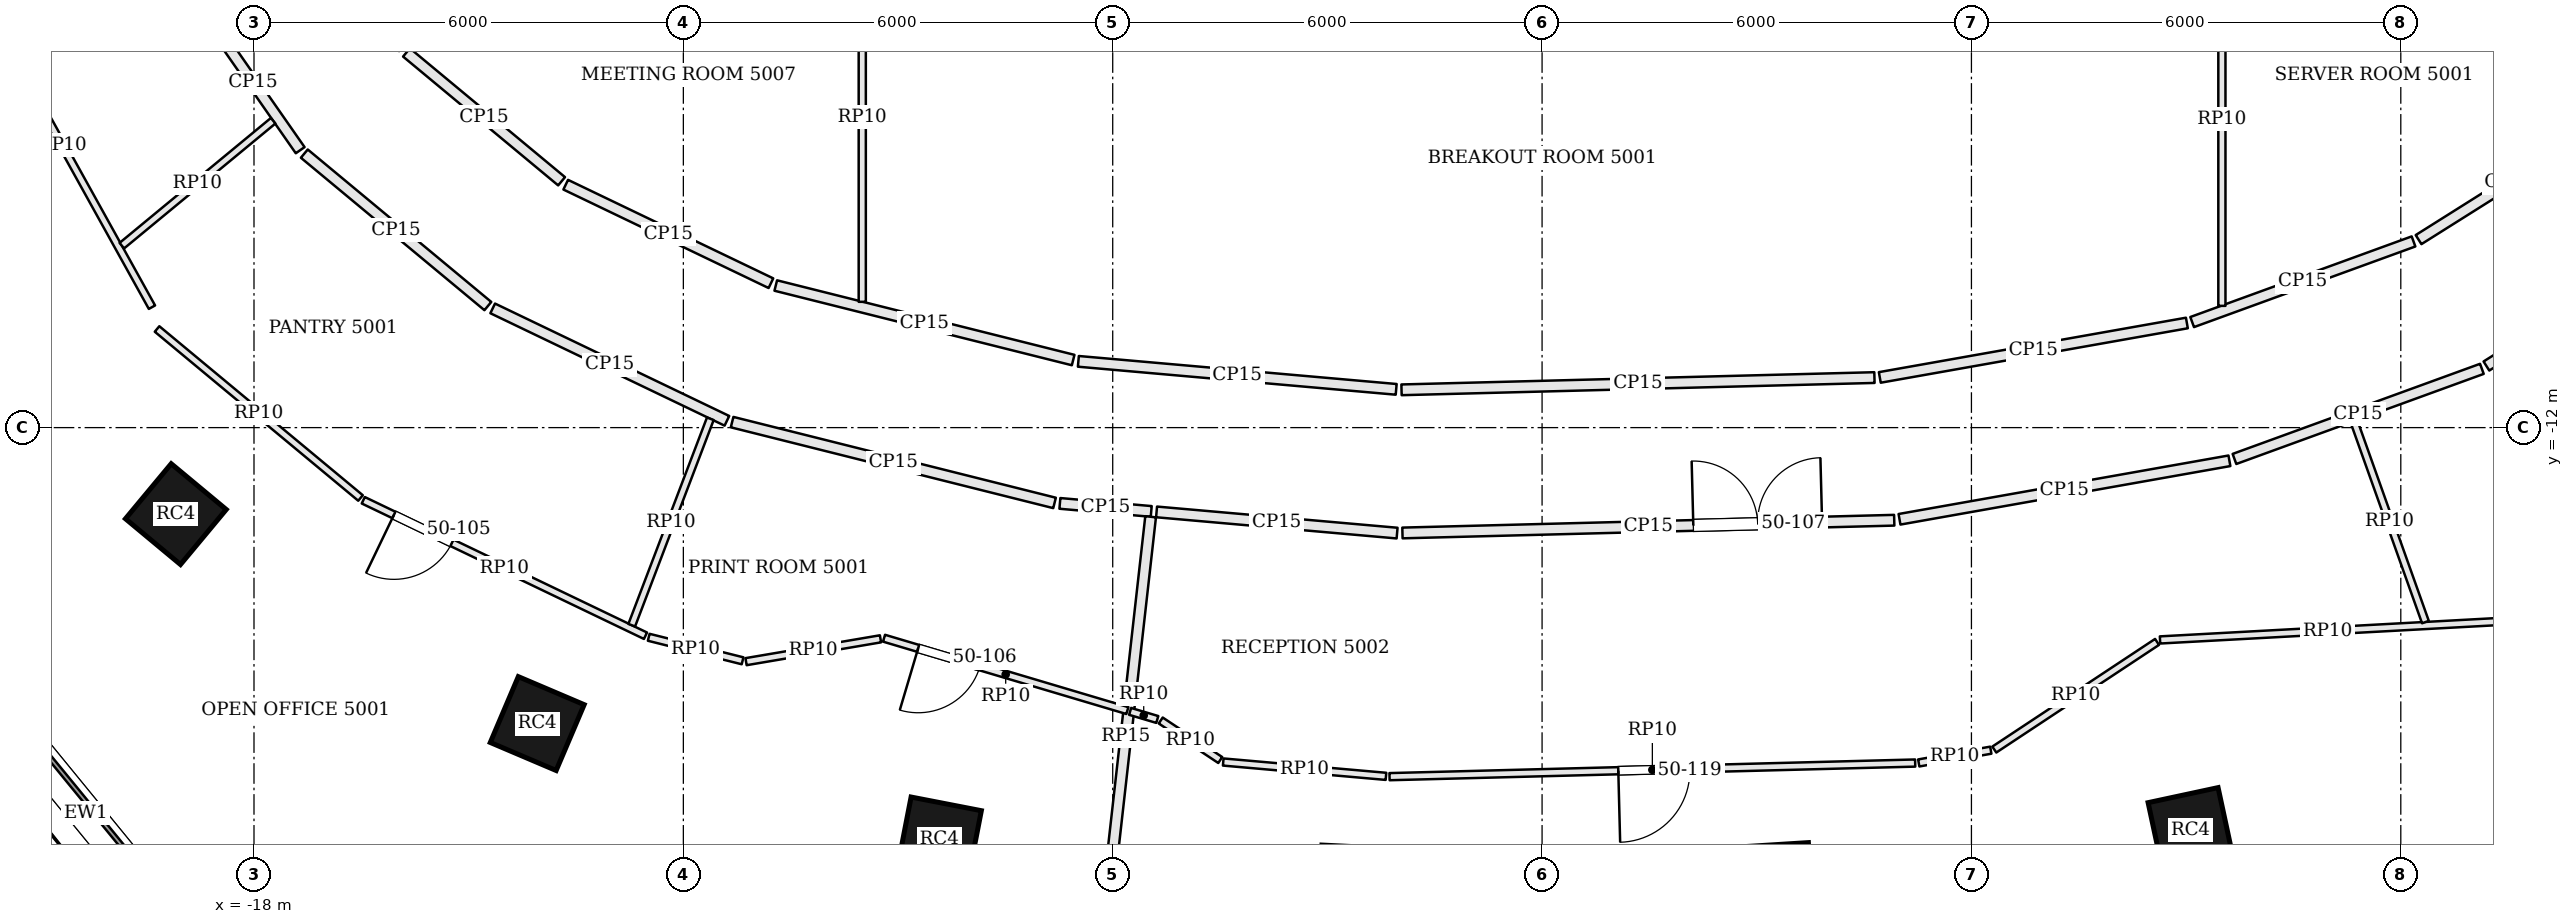
"""IFC4 building model, lengths in metres.
Left out: names, types, materials, properties, quantities, classifications, styles, units other than length and angle.
Written with IfcOpenShell. Run it as: python <this file> out.ifc"""

import sys

from ifc_helpers import new_model, si_unit, direction, frame, frame_2d, origin, origin_2d, place, context, subcontext, project, spatial, rectangle, extrude, element, fill, save


model = new_model("IFC4")
c1 = context("Model", 3, precision=1e-05, world=origin(), true_north=direction((0.0, 1.0)))
c2 = subcontext(c1, "Body", "Model", "MODEL_VIEW")
j1 = project(units=[si_unit("LENGTHUNIT", "METRE"), si_unit("PLANEANGLEUNIT", "RADIAN")], contexts=[c1])
p1 = place(None, origin())
s1 = spatial("IfcSite", under=j1, at=p1, CompositionType="ELEMENT")
p2 = place(p1, origin())
s2 = spatial("IfcBuilding", under=s1, at=p2, CompositionType="ELEMENT")
p3 = place(p2, frame((0.0, 0.0, 205.2)))
s3 = spatial("IfcBuildingStorey", under=s2, at=p3, CompositionType="ELEMENT", Elevation=205.2)
for number, where, z_axis, x_axis in (
    (1, (-19.092, -13.209, 0.0), (0.0, 0.0, 1.0), (0.769, -0.639, 0.0)),
    (2, (-14.042, -16.136, 0.0), (0.0, 0.0, 1.0), (0.92, -0.392, 0.0)),
    (3, (-8.422, -17.749, 0.0), (0.0, 0.0, 1.0), (0.982, -0.191, 0.0)),
    (4, (3.254, -18.33, 0.0), (0.0, 0.0, 1.0), (0.998, 0.063, 0.0)),
    (5, (9.063, -17.625, 0.0), (0.0, 0.0, 1.0), (0.978, 0.21, 0.0)),
):
    element("IfcColumn", number, at=place(p3, frame(where, z_axis=z_axis, x_axis=x_axis)), inside=s3, PredefinedType="COLUMN", context=c2, shape_type="SweptSolid", body=[
        extrude(rectangle(XDim=1.0, YDim=1.0, at=origin_2d()), origin(), (0.0, 0.0, 1.0), 3.9),
    ])
p4 = place(p3, frame((-21.696, -15.748, 0.0), z_axis=(0.0, 0.0, 1.0), x_axis=(0.632968710519, -0.774177377288, 0.0)))
e6 = element("IfcWall", 6, at=p4, inside=s3, PredefinedType="SOLIDWALL", context=c2, shape_type="SweptSolid", body=[
    extrude(rectangle(XDim=4.25, YDim=0.45, at=frame_2d((2.125, 0.0))), origin(), (0.0, 0.0, 1.0), 3.7),
])
p5 = place(p4, frame((1.075, 0.0, 0.9)))
e7 = element("IfcOpeningElement", 7, at=p5, cuts=e6, PredefinedType="OPENING", context=c2, shape_type="SweptSolid", body=[
    extrude(rectangle(XDim=2.1, YDim=2.3, at=frame_2d((1.05, 1.15))), frame((0.0, 0.235, 0.0), z_axis=(0.0, -1.0, 0.0), x_axis=(1.0, 0.0, 0.0)), (0.0, 0.0, 1.0), 0.47),
])
p6 = place(p3, frame((-20.168, -17.734, 3.9), z_axis=(0.0, 0.0, 1.0), x_axis=(0.632995189145, -0.774155727564, 0.0)))
e8 = element("IfcWall", 8, at=p6, inside=s3, PredefinedType="PARAPET", context=c2, shape_type="SweptSolid", body=[
    extrude(rectangle(XDim=1.589, YDim=0.3, at=frame_2d((0.795, 0.0))), origin(), (0.0, 0.0, 1.0), 1.1),
])
p7 = place(p3, frame((-18.674, -6.232, 0.0), z_axis=(0.0, 0.0, 1.0), x_axis=(0.572118665737, -0.820170855563, 0.0)))
e9 = element("IfcWall", 9, at=p7, inside=s3, PredefinedType="PARTITIONING", context=c2, shape_type="SweptSolid", body=[
    extrude(rectangle(XDim=2.306, YDim=0.15, at=frame_2d((1.153, 0.0))), origin(), (0.0, 0.0, 1.0), 3.084),
])
p8 = place(p3, frame((-17.297, -8.171, 0.0), z_axis=(0.0, 0.0, 1.0), x_axis=(0.769228575061, -0.638973707839, 0.0)))
e10 = element("IfcWall", 10, at=p8, inside=s3, PredefinedType="PARTITIONING", context=c2, shape_type="SweptSolid", body=[
    extrude(rectangle(XDim=3.334, YDim=0.15, at=frame_2d((1.667, 0.0))), origin(), (0.0, 0.0, 1.0), 3.084),
])
p9 = place(p3, frame((-14.664, -10.334, 0.0), z_axis=(0.0, 0.0, 1.0), x_axis=(0.901507315282, -0.432763862278, 0.0)))
e11 = element("IfcWall", 11, at=p9, inside=s3, PredefinedType="PARTITIONING", context=c2, shape_type="SweptSolid", body=[
    extrude(rectangle(XDim=3.63, YDim=0.15, at=frame_2d((1.815, 0.0))), origin(), (0.0, 0.0, 1.0), 3.084),
])
p10 = place(p3, frame((-11.319, -11.923, 0.0), z_axis=(0.0, 0.0, 1.0), x_axis=(0.969990815038, -0.243141561114, 0.0)))
e12 = element("IfcWall", 12, at=p10, inside=s3, PredefinedType="PARTITIONING", context=c2, shape_type="SweptSolid", body=[
    extrude(rectangle(XDim=4.645, YDim=0.15, at=frame_2d((2.323, 0.0))), origin(), (0.0, 0.0, 1.0), 3.084),
])
p11 = place(p3, frame((-6.738, -13.059, 0.0), z_axis=(0.0, 0.0, 1.0), x_axis=(0.996151409237, -0.087649129351, 0.0)))
e13 = element("IfcWall", 13, at=p11, inside=s3, PredefinedType="PARTITIONING", context=c2, shape_type="SweptSolid", body=[
    extrude(rectangle(XDim=1.281, YDim=0.15, at=frame_2d((0.641, 0.0))), origin(), (0.0, 0.0, 1.0), 3.084),
])
p12 = place(p3, frame((-6.161, -19.377, 0.0), z_axis=(0.0, 0.0, 1.0), x_axis=(0.111938367562, 0.993715151272, 0.0)))
e14 = element("IfcWall", 14, at=p12, inside=s3, PredefinedType="PARTITIONING", context=c2, shape_type="SweptSolid", body=[
    extrude(rectangle(XDim=6.17, YDim=0.15, at=frame_2d((3.085, 0.0))), origin(), (0.0, 0.0, 1.0), 3.184),
])
p13 = place(p3, frame((-5.387, -13.178, 0.0), z_axis=(0.0, 0.0, 1.0), x_axis=(0.996140835551, -0.087769218677, 0.0)))
e15 = element("IfcWall", 15, at=p13, inside=s3, PredefinedType="PARTITIONING", context=c2, shape_type="SweptSolid", body=[
    extrude(rectangle(XDim=3.374, YDim=0.15, at=frame_2d((1.687, 0.0))), origin(), (0.0, 0.0, 1.0), 3.084),
])
p14 = place(p3, frame((-1.951, -13.472, 0.0), z_axis=(0.0, 0.0, 1.0), x_axis=(0.999663898238, 0.025924709429, 0.0)))
e16 = element("IfcWall", 16, at=p14, inside=s3, PredefinedType="PARTITIONING", context=c2, shape_type="SweptSolid", body=[
    extrude(rectangle(XDim=6.875, YDim=0.15, at=frame_2d((3.437, 0.0))), origin(), (0.0, 0.0, 1.0), 3.084),
])
p15 = place(p14, frame((4.066, 0.0, 0.0)))
e17 = element("IfcOpeningElement", 17, at=p15, cuts=e16, PredefinedType="OPENING", context=c2, shape_type="SweptSolid", body=[
    extrude(rectangle(XDim=1.8, YDim=2.1, at=frame_2d((0.9, 1.05))), frame((0.0, 0.085, 0.0), z_axis=(0.0, -1.0, 0.0), x_axis=(1.0, 0.0, 0.0)), (0.0, 0.0, 1.0), 0.17),
])
p16 = place(p3, frame((4.995, -13.281, 0.0), z_axis=(0.0, 0.0, 1.0), x_axis=(0.98463411377, 0.174630071865, 0.0)))
e18 = element("IfcWall", 18, at=p16, inside=s3, PredefinedType="PARTITIONING", context=c2, shape_type="SweptSolid", body=[
    extrude(rectangle(XDim=4.682, YDim=0.15, at=frame_2d((2.341, 0.0))), origin(), (0.0, 0.0, 1.0), 3.084),
])
p17 = place(p3, frame((9.676, -12.438, 0.0), z_axis=(0.0, 0.0, 1.0), x_axis=(0.939640289748, 0.342163887461, 0.0)))
e19 = element("IfcWall", 19, at=p17, inside=s3, PredefinedType="PARTITIONING", context=c2, shape_type="SweptSolid", body=[
    extrude(rectangle(XDim=3.68, YDim=0.15, at=frame_2d((1.84, 0.0))), origin(), (0.0, 0.0, 1.0), 3.084),
])
p18 = place(p3, frame((13.197, -11.139, 0.0), z_axis=(0.0, 0.0, 1.0), x_axis=(0.846390903833, 0.532562144644, 0.0)))
e20 = element("IfcWall", 20, at=p18, inside=s3, PredefinedType="PARTITIONING", context=c2, shape_type="SweptSolid", body=[
    extrude(rectangle(XDim=3.481, YDim=0.15, at=frame_2d((1.741, 0.0))), origin(), (0.0, 0.0, 1.0), 3.084),
])
p19 = place(p18, frame((1.417, 0.0, 0.0)))
e21 = element("IfcOpeningElement", 21, at=p19, cuts=e20, PredefinedType="OPENING", context=c2, shape_type="SweptSolid", body=[
    extrude(rectangle(XDim=1.0, YDim=2.4, at=frame_2d((0.5, 1.2))), frame((0.0, 0.085, 0.0), z_axis=(0.0, -1.0, 0.0), x_axis=(1.0, 0.0, 0.0)), (0.0, 0.0, 1.0), 0.17),
])
p20 = place(p3, frame((14.777, -7.781, 0.0), z_axis=(0.0, 0.0, 1.0), x_axis=(-0.846359741043, -0.532611667862, 0.0)))
e22 = element("IfcWall", 22, at=p20, inside=s3, PredefinedType="PARTITIONING", context=c2, shape_type="SweptSolid", body=[
    extrude(rectangle(XDim=2.987, YDim=0.15, at=frame_2d((1.494, 0.0))), origin(), (0.0, 0.0, 1.0), 3.084),
])
p21 = place(p3, frame((12.178, -9.398, 0.0), z_axis=(0.0, 0.0, 1.0), x_axis=(-0.939609240084, -0.342249143093, 0.0)))
e23 = element("IfcWall", 23, at=p21, inside=s3, PredefinedType="PARTITIONING", context=c2, shape_type="SweptSolid", body=[
    extrude(rectangle(XDim=3.292, YDim=0.15, at=frame_2d((1.646, 0.0))), origin(), (0.0, 0.0, 1.0), 3.084),
])
p22 = place(p3, frame((9.01, -10.538, 0.0), z_axis=(0.0, 0.0, 1.0), x_axis=(-0.984645638575, -0.174565077936, 0.0)))
e24 = element("IfcWall", 24, at=p22, inside=s3, PredefinedType="PARTITIONING", context=c2, shape_type="SweptSolid", body=[
    extrude(rectangle(XDim=4.358, YDim=0.15, at=frame_2d((2.179, 0.0))), origin(), (0.0, 0.0, 1.0), 3.084),
])
p23 = place(p3, frame((4.645, -11.301, 0.0), z_axis=(0.0, 0.0, 1.0), x_axis=(-0.9996648469, -0.02588810291, 0.0)))
e25 = element("IfcWall", 25, at=p23, inside=s3, PredefinedType="PARTITIONING", context=c2, shape_type="SweptSolid", body=[
    extrude(rectangle(XDim=6.611, YDim=0.15, at=frame_2d((3.305, 0.0))), origin(), (0.0, 0.0, 1.0), 3.084),
])
p24 = place(p3, frame((-2.039, -11.465, 0.0), z_axis=(0.0, 0.0, 1.0), x_axis=(-0.996139855484, 0.087780341286, 0.0)))
e26 = element("IfcWall", 26, at=p24, inside=s3, PredefinedType="PARTITIONING", context=c2, shape_type="SweptSolid", body=[
    extrude(rectangle(XDim=4.458, YDim=0.15, at=frame_2d((2.229, 0.0))), origin(), (0.0, 0.0, 1.0), 3.084),
])
p25 = place(p3, frame((-6.553, -11.056, 0.0), z_axis=(0.0, 0.0, 1.0), x_axis=(-0.970004917182, 0.243085294995, 0.0)))
e27 = element("IfcWall", 27, at=p25, inside=s3, PredefinedType="PARTITIONING", context=c2, shape_type="SweptSolid", body=[
    extrude(rectangle(XDim=4.284, YDim=0.15, at=frame_2d((2.142, 0.0))), origin(), (0.0, 0.0, 1.0), 3.084),
])
p26 = place(p3, frame((-10.776, -9.982, 0.0), z_axis=(0.0, 0.0, 1.0), x_axis=(-0.901511079436, 0.432756020933, 0.0)))
e28 = element("IfcWall", 28, at=p26, inside=s3, PredefinedType="PARTITIONING", context=c2, shape_type="SweptSolid", body=[
    extrude(rectangle(XDim=3.181, YDim=0.15, at=frame_2d((1.59, 0.0))), origin(), (0.0, 0.0, 1.0), 3.084),
])
p27 = place(p3, frame((-13.702, -8.557, 0.0), z_axis=(0.0, 0.0, 1.0), x_axis=(-0.769221825067, 0.638981833733, 0.0)))
e29 = element("IfcWall", 29, at=p27, inside=s3, PredefinedType="PARTITIONING", context=c2, shape_type="SweptSolid", body=[
    extrude(rectangle(XDim=2.817, YDim=0.15, at=frame_2d((1.409, 0.0))), origin(), (0.0, 0.0, 1.0), 3.084),
])
p28 = place(p3, frame((-5.795, -15.954, 0.0), z_axis=(0.0, 0.0, 1.0), x_axis=(-0.95851298226, 0.285048877981, 0.0)))
e30 = element("IfcWall", 30, at=p28, inside=s3, PredefinedType="PARTITIONING", context=c2, shape_type="SweptSolid", body=[
    extrude(rectangle(XDim=3.548, YDim=0.1, at=frame_2d((1.774, 0.0))), origin(), (0.0, 0.0, 1.0), 3.084),
])
p29 = place(p28, frame((2.15, 0.0, 0.0)))
e31 = element("IfcOpeningElement", 31, at=p29, cuts=e30, PredefinedType="OPENING", context=c2, shape_type="SweptSolid", body=[
    extrude(rectangle(XDim=0.9, YDim=2.1, at=frame_2d((0.45, 1.05))), frame((0.0, 0.06, 0.0), z_axis=(0.0, -1.0, 0.0), x_axis=(1.0, 0.0, 0.0)), (0.0, 0.0, 1.0), 0.12),
])
p30 = place(p3, frame((-9.245, -14.952, 0.0), z_axis=(0.0, 0.0, 1.0), x_axis=(-0.985862618802, -0.167555652988, 0.0)))
e32 = element("IfcWall", 32, at=p30, inside=s3, PredefinedType="PARTITIONING", context=c2, shape_type="SweptSolid", body=[
    extrude(rectangle(XDim=1.906, YDim=0.1, at=frame_2d((0.953, 0.0))), origin(), (0.0, 0.0, 1.0), 3.084),
])
p31 = place(p3, frame((-11.173, -15.259, 0.0), z_axis=(0.0, 0.0, 1.0), x_axis=(-0.970004236747, 0.243088010177, 0.0)))
e33 = element("IfcWall", 33, at=p31, inside=s3, PredefinedType="PARTITIONING", context=c2, shape_type="SweptSolid", body=[
    extrude(rectangle(XDim=1.352, YDim=0.1, at=frame_2d((0.676, 0.0))), origin(), (0.0, 0.0, 1.0), 3.084),
])
p32 = place(p3, frame((-12.529, -14.909, 0.0), z_axis=(0.0, 0.0, 1.0), x_axis=(-0.901499543351, 0.432780051918, 0.0)))
e34 = element("IfcWall", 34, at=p32, inside=s3, PredefinedType="PARTITIONING", context=c2, shape_type="SweptSolid", body=[
    extrude(rectangle(XDim=4.375, YDim=0.1, at=frame_2d((2.188, 0.0))), origin(), (0.0, 0.0, 1.0), 3.084),
])
p33 = place(p32, frame((3.0, 0.0, 0.0)))
e35 = element("IfcOpeningElement", 35, at=p33, cuts=e34, PredefinedType="OPENING", context=c2, shape_type="SweptSolid", body=[
    extrude(rectangle(XDim=0.9, YDim=2.1, at=frame_2d((0.45, 1.05))), frame((0.0, 0.06, 0.0), z_axis=(0.0, -1.0, 0.0), x_axis=(1.0, 0.0, 0.0)), (0.0, 0.0, 1.0), 0.12),
])
p34 = place(p3, frame((-16.511, -12.983, 0.0), z_axis=(0.0, 0.0, 1.0), x_axis=(-0.769227332821, 0.638975203307, 0.0)))
e36 = element("IfcWall", 36, at=p34, inside=s3, PredefinedType="PARTITIONING", context=c2, shape_type="SweptSolid", body=[
    extrude(rectangle(XDim=3.696, YDim=0.1, at=frame_2d((1.848, 0.0))), origin(), (0.0, 0.0, 1.0), 3.084),
])
p35 = place(p3, frame((-19.426, -10.317, 0.0), z_axis=(0.0, 0.0, 1.0), x_axis=(-0.485125918375, 0.874444305443, 0.0)))
e37 = element("IfcWall", 37, at=p35, inside=s3, PredefinedType="PARTITIONING", context=c2, shape_type="SweptSolid", body=[
    extrude(rectangle(XDim=5.173, YDim=0.1, at=frame_2d((2.586, 0.0))), origin(), (0.0, 0.0, 1.0), 3.084),
])
p36 = place(p3, frame((-17.733, -7.712, 0.0), z_axis=(0.0, 0.0, 1.0), x_axis=(-0.771096712333, -0.636718038247, 0.0)))
e38 = element("IfcWall", 38, at=p36, inside=s3, PredefinedType="PARTITIONING", context=c2, shape_type="SweptSolid", body=[
    extrude(rectangle(XDim=2.741, YDim=0.1, at=frame_2d((1.371, 0.0))), origin(), (0.0, 0.0, 1.0), 3.084),
])
p37 = place(p3, frame((-11.623, -11.877, 0.0), z_axis=(0.0, 0.0, 1.0), x_axis=(-0.355748592272, -0.93458169204, 0.0)))
e39 = element("IfcWall", 39, at=p37, inside=s3, PredefinedType="PARTITIONING", context=c2, shape_type="SweptSolid", body=[
    extrude(rectangle(XDim=3.086, YDim=0.1, at=frame_2d((1.543, 0.0))), origin(), (0.0, 0.0, 1.0), 3.084),
])
p38 = place(p3, frame((13.324, -14.712, 0.0), z_axis=(0.0, 0.0, 1.0), x_axis=(-0.998525562832, -0.054283518413, 0.0)))
e40 = element("IfcWall", 40, at=p38, inside=s3, PredefinedType="PARTITIONING", context=c2, shape_type="SweptSolid", body=[
    extrude(rectangle(XDim=4.695, YDim=0.1, at=frame_2d((2.348, 0.0))), origin(), (0.0, 0.0, 1.0), 3.084),
])
p39 = place(p3, frame((8.594, -14.995, 0.0), z_axis=(0.0, 0.0, 1.0), x_axis=(-0.834069742789, -0.55165901077, 0.0)))
e41 = element("IfcWall", 41, at=p39, inside=s3, PredefinedType="PARTITIONING", context=c2, shape_type="SweptSolid", body=[
    extrude(rectangle(XDim=2.727, YDim=0.1, at=frame_2d((1.363, 0.0))), origin(), (0.0, 0.0, 1.0), 3.084),
])
p40 = place(p3, frame((6.271, -16.508, 0.0), z_axis=(0.0, 0.0, 1.0), x_axis=(-0.984643798133, -0.174575458752, 0.0)))
e42 = element("IfcWall", 42, at=p40, inside=s3, PredefinedType="PARTITIONING", context=c2, shape_type="SweptSolid", body=[
    extrude(rectangle(XDim=1.022, YDim=0.1, at=frame_2d((0.511, 0.0))), origin(), (0.0, 0.0, 1.0), 3.084),
])
p41 = place(p3, frame((5.214, -16.688, 0.0), z_axis=(0.0, 0.0, 1.0), x_axis=(-0.999664981446, -0.025882906921, 0.0)))
e43 = element("IfcWall", 43, at=p41, inside=s3, PredefinedType="PARTITIONING", context=c2, shape_type="SweptSolid", body=[
    extrude(rectangle(XDim=7.348, YDim=0.1, at=frame_2d((3.674, 0.0))), origin(), (0.0, 0.0, 1.0), 3.084),
])
p42 = place(p41, frame((3.15, 0.0, 0.0)))
e44 = element("IfcOpeningElement", 44, at=p42, cuts=e43, PredefinedType="OPENING", context=c2, shape_type="SweptSolid", body=[
    extrude(rectangle(XDim=1.0, YDim=2.1, at=frame_2d((0.5, 1.05))), frame((0.0, 0.06, 0.0), z_axis=(0.0, -1.0, 0.0), x_axis=(1.0, 0.0, 0.0)), (0.0, 0.0, 1.0), 0.12),
])
p43 = place(p3, frame((-2.181, -16.874, 0.0), z_axis=(0.0, 0.0, 1.0), x_axis=(-0.996147729226, 0.087690943421, 0.0)))
e45 = element("IfcWall", 45, at=p43, inside=s3, PredefinedType="PARTITIONING", context=c2, shape_type="SweptSolid", body=[
    extrude(rectangle(XDim=2.283, YDim=0.1, at=frame_2d((1.142, 0.0))), origin(), (0.0, 0.0, 1.0), 3.084),
])
p44 = place(p3, frame((-4.497, -16.646, 0.0), z_axis=(0.0, 0.0, 1.0), x_axis=(-0.832989458456, 0.55328885955, 0.0)))
e46 = element("IfcWall", 46, at=p44, inside=s3, PredefinedType="PARTITIONING", context=c2, shape_type="SweptSolid", body=[
    extrude(rectangle(XDim=0.999, YDim=0.1, at=frame_2d((0.499, 0.0))), origin(), (0.0, 0.0, 1.0), 3.084),
])
p45 = place(p3, frame((-5.377, -16.079, 0.0), z_axis=(0.0, 0.0, 1.0), x_axis=(-0.958536356279, 0.284970268083, 0.0)))
e47 = element("IfcWall", 47, at=p45, inside=s3, PredefinedType="PARTITIONING", context=c2, shape_type="SweptSolid", body=[
    extrude(rectangle(XDim=0.396, YDim=0.1, at=frame_2d((0.198, 0.0))), origin(), (0.0, 0.0, 1.0), 3.084),
])
p46 = place(p3, frame((11.344, -11.91, 0.0), z_axis=(0.0, 0.0, 1.0), x_axis=(0.335454055984, -0.942056567476, 0.0)))
e48 = element("IfcWall", 48, at=p46, inside=s3, PredefinedType="PARTITIONING", context=c2, shape_type="SweptSolid", body=[
    extrude(rectangle(XDim=2.98, YDim=0.1, at=frame_2d((1.49, 0.0))), origin(), (0.0, 0.0, 1.0), 3.084),
])
p47 = place(p3, frame((-9.5, -10.242, 0.0), z_axis=(0.0, 0.0, 1.0), x_axis=(0.0, 1.0, 0.0)))
e49 = element("IfcWall", 49, at=p47, inside=s3, PredefinedType="PARTITIONING", context=c2, shape_type="SweptSolid", body=[
    extrude(rectangle(XDim=5.167, YDim=0.1, at=frame_2d((2.583, 0.0))), origin(), (0.0, 0.0, 1.0), 3.084),
])
p48 = place(p3, frame((9.5, -10.299, 0.0), z_axis=(0.0, 0.0, 1.0), x_axis=(0.0, 1.0, 0.0)))
e50 = element("IfcWall", 50, at=p48, inside=s3, PredefinedType="PARTITIONING", context=c2, shape_type="SweptSolid", body=[
    extrude(rectangle(XDim=5.224, YDim=0.1, at=frame_2d((2.612, 0.0))), origin(), (0.0, 0.0, 1.0), 3.084),
])
p49 = place(p5, origin())
e51 = element("IfcWindow", 51, at=p49, inside=s3, PartitioningType="SINGLE_PANEL", PredefinedType="WINDOW", context=c2, shape_type="SweptSolid", body=[
    extrude(rectangle(XDim=2.1, YDim=2.3, at=frame_2d((1.05, 1.15))), frame((0.0, 0.135, 0.0), z_axis=(0.0, -1.0, 0.0), x_axis=(1.0, 0.0, 0.0)), (0.0, 0.0, 1.0), 0.06),
])
fill(e7, e51)
p50 = place(p33, origin())
e52 = element("IfcDoor", 52, at=p50, inside=s3, OperationType="SINGLE_SWING_RIGHT", PredefinedType="DOOR", context=c2, shape_type="SweptSolid", body=[
    extrude(rectangle(XDim=0.9, YDim=2.1, at=frame_2d((0.45, 1.05))), frame((0.0, 0.025, 0.0), z_axis=(0.0, -1.0, 0.0), x_axis=(1.0, 0.0, 0.0)), (0.0, 0.0, 1.0), 0.05),
])
fill(e35, e52)
p51 = place(p29, origin())
e53 = element("IfcDoor", 53, at=p51, inside=s3, OperationType="SINGLE_SWING_RIGHT", PredefinedType="DOOR", context=c2, shape_type="SweptSolid", body=[
    extrude(rectangle(XDim=0.9, YDim=2.1, at=frame_2d((0.45, 1.05))), frame((0.0, 0.025, 0.0), z_axis=(0.0, -1.0, 0.0), x_axis=(1.0, 0.0, 0.0)), (0.0, 0.0, 1.0), 0.05),
])
fill(e31, e53)
p52 = place(p15, origin())
e54 = element("IfcDoor", 54, at=p52, inside=s3, OperationType="DOUBLE_DOOR_SINGLE_SWING", PredefinedType="DOOR", context=c2, shape_type="SweptSolid", body=[
    extrude(rectangle(XDim=1.8, YDim=2.1, at=frame_2d((0.9, 1.05))), frame((0.0, 0.025, 0.0), z_axis=(0.0, -1.0, 0.0), x_axis=(1.0, 0.0, 0.0)), (0.0, 0.0, 1.0), 0.05),
])
fill(e17, e54)
p53 = place(p42, origin())
e55 = element("IfcDoor", 55, at=p53, inside=s3, OperationType="SINGLE_SWING_RIGHT", PredefinedType="DOOR", context=c2, shape_type="SweptSolid", body=[
    extrude(rectangle(XDim=1.0, YDim=2.1, at=frame_2d((0.5, 1.05))), frame((0.0, 0.025, 0.0), z_axis=(0.0, -1.0, 0.0), x_axis=(1.0, 0.0, 0.0)), (0.0, 0.0, 1.0), 0.05),
])
fill(e44, e55)
save(model, sys.argv[1])
